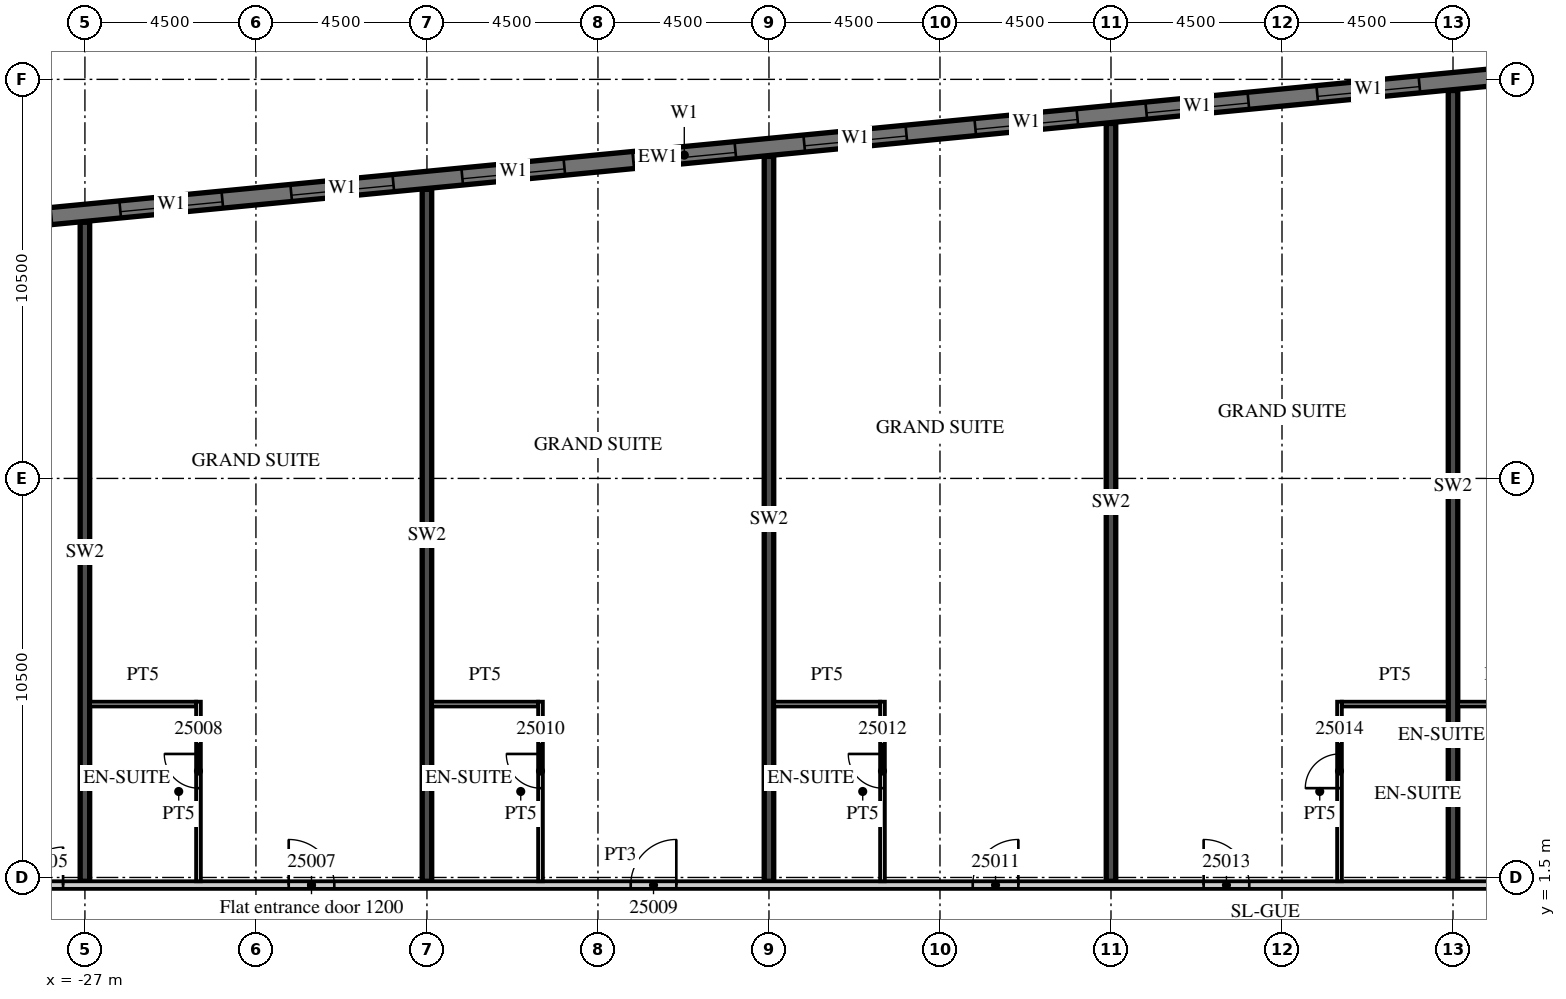
"""IFC4 building model, lengths in metres.
Left out: names, types, materials, properties, quantities, classifications, styles, units other than length and angle.
Written with IfcOpenShell. Run it as: python <this file> out.ifc"""

import sys

from ifc_helpers import new_model, si_unit, direction, frame, frame_2d, origin, place, context, subcontext, project, spatial, rectangle, extrude, element, fill, save


model = new_model("IFC4")
c1 = context("Model", 3, precision=1e-05, world=origin(), true_north=direction((0.0, 1.0)))
c2 = subcontext(c1, "Body", "Model", "MODEL_VIEW")
j1 = project(units=[si_unit("LENGTHUNIT", "METRE"), si_unit("PLANEANGLEUNIT", "RADIAN")], contexts=[c1])
p1 = place(None, origin())
s1 = spatial("IfcSite", under=j1, at=p1, CompositionType="ELEMENT")
p2 = place(p1, origin())
s2 = spatial("IfcBuilding", under=s1, at=p2, CompositionType="ELEMENT")
p3 = place(p2, frame((0.0, 0.0, 117.4)))
s3 = spatial("IfcBuildingStorey", under=s2, at=p3, CompositionType="ELEMENT", Elevation=117.4)
p4 = place(p3, frame((-27.0, 1.4, 0.0), z_axis=(0.0, 0.0, 1.0), x_axis=(0.0, 1.0, 0.0)))
e1 = element("IfcWall", 1, at=p4, inside=s3, PredefinedType="SHEAR", context=c2, shape_type="SweptSolid", body=[
    extrude(rectangle(XDim=17.34, YDim=0.25, at=frame_2d((8.67, 0.0))), origin(), (0.0, 0.0, 1.0), 3.3),
])
p5 = place(p3, frame((-18.0, 1.4, 0.0), z_axis=(0.0, 0.0, 1.0), x_axis=(0.0, 1.0, 0.0)))
e2 = element("IfcWall", 2, at=p5, inside=s3, PredefinedType="SHEAR", context=c2, shape_type="SweptSolid", body=[
    extrude(rectangle(XDim=18.207, YDim=0.25, at=frame_2d((9.104, 0.0))), origin(), (0.0, 0.0, 1.0), 3.3),
])
p6 = place(p3, frame((-9.0, 1.4, 0.0), z_axis=(0.0, 0.0, 1.0), x_axis=(0.0, 1.0, 0.0)))
e3 = element("IfcWall", 3, at=p6, inside=s3, PredefinedType="SHEAR", context=c2, shape_type="SweptSolid", body=[
    extrude(rectangle(XDim=19.073, YDim=0.25, at=frame_2d((9.537, 0.0))), origin(), (0.0, 0.0, 1.0), 3.3),
])
p7 = place(p3, frame((0.0, 1.4, 0.0), z_axis=(0.0, 0.0, 1.0), x_axis=(0.0, 1.0, 0.0)))
e4 = element("IfcWall", 4, at=p7, inside=s3, PredefinedType="SHEAR", context=c2, shape_type="SweptSolid", body=[
    extrude(rectangle(XDim=19.94, YDim=0.25, at=frame_2d((9.97, 0.0))), origin(), (0.0, 0.0, 1.0), 3.3),
])
p8 = place(p3, frame((9.0, 1.4, 0.0), z_axis=(0.0, 0.0, 1.0), x_axis=(0.0, 1.0, 0.0)))
e5 = element("IfcWall", 5, at=p8, inside=s3, PredefinedType="SHEAR", context=c2, shape_type="SweptSolid", body=[
    extrude(rectangle(XDim=20.807, YDim=0.25, at=frame_2d((10.403, 0.0))), origin(), (0.0, 0.0, 1.0), 3.3),
])
p9 = place(p3, frame((13.521, 22.89, 0.0), z_axis=(0.0, 0.0, 1.0), x_axis=(-0.995396445054, -0.095843190545, 0.0)))
e6 = element("IfcWall", 6, at=p9, inside=s3, PredefinedType="SOLIDWALL", context=c2, shape_type="SweptSolid", body=[
    extrude(rectangle(XDim=51.114, YDim=0.45, at=frame_2d((25.557, 0.0))), origin(), (0.0, 0.0, 1.0), 3.02),
])
p10 = place(p9, frame((0.91, 0.0, 0.45)))
e7 = element("IfcOpeningElement", 7, at=p10, cuts=e6, PredefinedType="OPENING", context=c2, shape_type="SweptSolid", body=[
    extrude(rectangle(XDim=2.7, YDim=2.25, at=frame_2d((1.35, 1.125))), frame((0.0, 0.235, 0.0), z_axis=(0.0, -1.0, 0.0), x_axis=(1.0, 0.0, 0.0)), (0.0, 0.0, 1.0), 0.47),
])
p11 = place(p9, frame((5.431, 0.0, 0.45)))
e8 = element("IfcOpeningElement", 8, at=p11, cuts=e6, PredefinedType="OPENING", context=c2, shape_type="SweptSolid", body=[
    extrude(rectangle(XDim=2.7, YDim=2.25, at=frame_2d((1.35, 1.125))), frame((0.0, 0.235, 0.0), z_axis=(0.0, -1.0, 0.0), x_axis=(1.0, 0.0, 0.0)), (0.0, 0.0, 1.0), 0.47),
])
p12 = place(p9, frame((9.952, 0.0, 0.45)))
e9 = element("IfcOpeningElement", 9, at=p12, cuts=e6, PredefinedType="OPENING", context=c2, shape_type="SweptSolid", body=[
    extrude(rectangle(XDim=2.7, YDim=2.25, at=frame_2d((1.35, 1.125))), frame((0.0, 0.235, 0.0), z_axis=(0.0, -1.0, 0.0), x_axis=(1.0, 0.0, 0.0)), (0.0, 0.0, 1.0), 0.47),
])
p13 = place(p9, frame((14.473, 0.0, 0.45)))
e10 = element("IfcOpeningElement", 10, at=p13, cuts=e6, PredefinedType="OPENING", context=c2, shape_type="SweptSolid", body=[
    extrude(rectangle(XDim=2.7, YDim=2.25, at=frame_2d((1.35, 1.125))), frame((0.0, 0.235, 0.0), z_axis=(0.0, -1.0, 0.0), x_axis=(1.0, 0.0, 0.0)), (0.0, 0.0, 1.0), 0.47),
])
p14 = place(p9, frame((18.994, 0.0, 0.45)))
e11 = element("IfcOpeningElement", 11, at=p14, cuts=e6, PredefinedType="OPENING", context=c2, shape_type="SweptSolid", body=[
    extrude(rectangle(XDim=2.7, YDim=2.25, at=frame_2d((1.35, 1.125))), frame((0.0, 0.235, 0.0), z_axis=(0.0, -1.0, 0.0), x_axis=(1.0, 0.0, 0.0)), (0.0, 0.0, 1.0), 0.47),
])
p15 = place(p9, frame((23.514, 0.0, 0.45)))
e12 = element("IfcOpeningElement", 12, at=p15, cuts=e6, PredefinedType="OPENING", context=c2, shape_type="SweptSolid", body=[
    extrude(rectangle(XDim=2.7, YDim=2.25, at=frame_2d((1.35, 1.125))), frame((0.0, 0.235, 0.0), z_axis=(0.0, -1.0, 0.0), x_axis=(1.0, 0.0, 0.0)), (0.0, 0.0, 1.0), 0.47),
])
p16 = place(p9, frame((28.035, 0.0, 0.45)))
e13 = element("IfcOpeningElement", 13, at=p16, cuts=e6, PredefinedType="OPENING", context=c2, shape_type="SweptSolid", body=[
    extrude(rectangle(XDim=2.7, YDim=2.25, at=frame_2d((1.35, 1.125))), frame((0.0, 0.235, 0.0), z_axis=(0.0, -1.0, 0.0), x_axis=(1.0, 0.0, 0.0)), (0.0, 0.0, 1.0), 0.47),
])
p17 = place(p9, frame((32.556, 0.0, 0.45)))
e14 = element("IfcOpeningElement", 14, at=p17, cuts=e6, PredefinedType="OPENING", context=c2, shape_type="SweptSolid", body=[
    extrude(rectangle(XDim=2.7, YDim=2.25, at=frame_2d((1.35, 1.125))), frame((0.0, 0.235, 0.0), z_axis=(0.0, -1.0, 0.0), x_axis=(1.0, 0.0, 0.0)), (0.0, 0.0, 1.0), 0.47),
])
p18 = place(p9, frame((37.077, 0.0, 0.45)))
e15 = element("IfcOpeningElement", 15, at=p18, cuts=e6, PredefinedType="OPENING", context=c2, shape_type="SweptSolid", body=[
    extrude(rectangle(XDim=2.7, YDim=2.25, at=frame_2d((1.35, 1.125))), frame((0.0, 0.235, 0.0), z_axis=(0.0, -1.0, 0.0), x_axis=(1.0, 0.0, 0.0)), (0.0, 0.0, 1.0), 0.47),
])
p19 = place(p9, frame((41.598, 0.0, 0.45)))
e16 = element("IfcOpeningElement", 16, at=p19, cuts=e6, PredefinedType="OPENING", context=c2, shape_type="SweptSolid", body=[
    extrude(rectangle(XDim=2.7, YDim=2.25, at=frame_2d((1.35, 1.125))), frame((0.0, 0.235, 0.0), z_axis=(0.0, -1.0, 0.0), x_axis=(1.0, 0.0, 0.0)), (0.0, 0.0, 1.0), 0.47),
])
p20 = place(p9, frame((46.118, 0.0, 0.45)))
e17 = element("IfcOpeningElement", 17, at=p20, cuts=e6, PredefinedType="OPENING", context=c2, shape_type="SweptSolid", body=[
    extrude(rectangle(XDim=2.7, YDim=2.25, at=frame_2d((1.35, 1.125))), frame((0.0, 0.235, 0.0), z_axis=(0.0, -1.0, 0.0), x_axis=(1.0, 0.0, 0.0)), (0.0, 0.0, 1.0), 0.47),
])
p21 = place(p3, frame((-39.316, 1.3, 0.0), z_axis=(0.0, 0.0, 1.0), x_axis=(1.0, 0.0, 0.0)))
e18 = element("IfcWall", 18, at=p21, inside=s3, PredefinedType="PARTITIONING", context=c2, shape_type="SweptSolid", body=[
    extrude(rectangle(XDim=52.816, YDim=0.2, at=frame_2d((26.408, 0.0))), origin(), (0.0, 0.0, 1.0), 3.02),
])
p22 = place(p21, frame((0.15, 0.0, 0.0)))
e19 = element("IfcOpeningElement", 19, at=p22, cuts=e18, PredefinedType="OPENING", context=c2, shape_type="SweptSolid", body=[
    extrude(rectangle(XDim=0.9, YDim=2.1, at=frame_2d((0.45, 1.05))), frame((0.0, 0.11, 0.0), z_axis=(0.0, -1.0, 0.0), x_axis=(1.0, 0.0, 0.0)), (0.0, 0.0, 1.0), 0.22),
])
p23 = place(p21, frame((6.266, 0.0, 0.0)))
e20 = element("IfcOpeningElement", 20, at=p23, cuts=e18, PredefinedType="OPENING", context=c2, shape_type="SweptSolid", body=[
    extrude(rectangle(XDim=1.0, YDim=2.1, at=frame_2d((0.5, 1.05))), frame((0.0, 0.11, 0.0), z_axis=(0.0, -1.0, 0.0), x_axis=(1.0, 0.0, 0.0)), (0.0, 0.0, 1.0), 0.22),
])
p24 = place(p21, frame((10.741, 0.0, 0.0)))
e21 = element("IfcOpeningElement", 21, at=p24, cuts=e18, PredefinedType="OPENING", context=c2, shape_type="SweptSolid", body=[
    extrude(rectangle(XDim=1.0, YDim=2.1, at=frame_2d((0.5, 1.05))), frame((0.0, 0.11, 0.0), z_axis=(0.0, -1.0, 0.0), x_axis=(1.0, 0.0, 0.0)), (0.0, 0.0, 1.0), 0.22),
])
p25 = place(p21, frame((17.678, 0.0, 0.0)))
e22 = element("IfcOpeningElement", 22, at=p25, cuts=e18, PredefinedType="OPENING", context=c2, shape_type="SweptSolid", body=[
    extrude(rectangle(XDim=1.2, YDim=2.1, at=frame_2d((0.6, 1.05))), frame((0.0, 0.11, 0.0), z_axis=(0.0, -1.0, 0.0), x_axis=(1.0, 0.0, 0.0)), (0.0, 0.0, 1.0), 0.22),
])
p26 = place(p21, frame((26.678, 0.0, 0.0)))
e23 = element("IfcOpeningElement", 23, at=p26, cuts=e18, PredefinedType="OPENING", context=c2, shape_type="SweptSolid", body=[
    extrude(rectangle(XDim=1.2, YDim=2.1, at=frame_2d((0.6, 1.05))), frame((0.0, 0.11, 0.0), z_axis=(0.0, -1.0, 0.0), x_axis=(1.0, 0.0, 0.0)), (0.0, 0.0, 1.0), 0.22),
])
p27 = place(p21, frame((35.678, 0.0, 0.0)))
e24 = element("IfcOpeningElement", 24, at=p27, cuts=e18, PredefinedType="OPENING", context=c2, shape_type="SweptSolid", body=[
    extrude(rectangle(XDim=1.2, YDim=2.1, at=frame_2d((0.6, 1.05))), frame((0.0, 0.11, 0.0), z_axis=(0.0, -1.0, 0.0), x_axis=(1.0, 0.0, 0.0)), (0.0, 0.0, 1.0), 0.22),
])
p28 = place(p21, frame((41.754, 0.0, 0.0)))
e25 = element("IfcOpeningElement", 25, at=p28, cuts=e18, PredefinedType="OPENING", context=c2, shape_type="SweptSolid", body=[
    extrude(rectangle(XDim=1.2, YDim=2.1, at=frame_2d((0.6, 1.05))), frame((0.0, 0.11, 0.0), z_axis=(0.0, -1.0, 0.0), x_axis=(1.0, 0.0, 0.0)), (0.0, 0.0, 1.0), 0.22),
])
p29 = place(p21, frame((51.241, 0.0, 0.0)))
e26 = element("IfcOpeningElement", 26, at=p29, cuts=e18, PredefinedType="OPENING", context=c2, shape_type="SweptSolid", body=[
    extrude(rectangle(XDim=1.0, YDim=2.1, at=frame_2d((0.5, 1.05))), frame((0.0, 0.11, 0.0), z_axis=(0.0, -1.0, 0.0), x_axis=(1.0, 0.0, 0.0)), (0.0, 0.0, 1.0), 0.22),
])
p30 = place(p3, frame((-24.012, 1.4, 0.0), z_axis=(0.0, 0.0, 1.0), x_axis=(0.0, 1.0, 0.0)))
e27 = element("IfcWall", 27, at=p30, inside=s3, PredefinedType="PARTITIONING", context=c2, shape_type="SweptSolid", body=[
    extrude(rectangle(XDim=4.725, YDim=0.125, at=frame_2d((2.363, 0.0))), origin(), (0.0, 0.0, 1.0), 3.02),
])
p31 = place(p30, frame((2.45, 0.0, 0.0)))
e28 = element("IfcOpeningElement", 28, at=p31, cuts=e27, PredefinedType="OPENING", context=c2, shape_type="SweptSolid", body=[
    extrude(rectangle(XDim=0.9, YDim=2.1, at=frame_2d((0.45, 1.05))), frame((0.0, 0.073, 0.0), z_axis=(0.0, -1.0, 0.0), x_axis=(1.0, 0.0, 0.0)), (0.0, 0.0, 1.0), 0.145),
])
p32 = place(p3, frame((-26.875, 6.062, 0.0), z_axis=(0.0, 0.0, 1.0), x_axis=(1.0, 0.0, 0.0)))
e29 = element("IfcWall", 29, at=p32, inside=s3, PredefinedType="PARTITIONING", context=c2, shape_type="SweptSolid", body=[
    extrude(rectangle(XDim=2.8, YDim=0.125, at=frame_2d((1.4, 0.0))), origin(), (0.0, 0.0, 1.0), 3.02),
])
p33 = place(p3, frame((-15.012, 1.4, 0.0), z_axis=(0.0, 0.0, 1.0), x_axis=(0.0, 1.0, 0.0)))
e30 = element("IfcWall", 30, at=p33, inside=s3, PredefinedType="PARTITIONING", context=c2, shape_type="SweptSolid", body=[
    extrude(rectangle(XDim=4.725, YDim=0.125, at=frame_2d((2.363, 0.0))), origin(), (0.0, 0.0, 1.0), 3.02),
])
p34 = place(p33, frame((2.45, 0.0, 0.0)))
e31 = element("IfcOpeningElement", 31, at=p34, cuts=e30, PredefinedType="OPENING", context=c2, shape_type="SweptSolid", body=[
    extrude(rectangle(XDim=0.9, YDim=2.1, at=frame_2d((0.45, 1.05))), frame((0.0, 0.073, 0.0), z_axis=(0.0, -1.0, 0.0), x_axis=(1.0, 0.0, 0.0)), (0.0, 0.0, 1.0), 0.145),
])
p35 = place(p3, frame((-17.875, 6.062, 0.0), z_axis=(0.0, 0.0, 1.0), x_axis=(1.0, 0.0, 0.0)))
e32 = element("IfcWall", 32, at=p35, inside=s3, PredefinedType="PARTITIONING", context=c2, shape_type="SweptSolid", body=[
    extrude(rectangle(XDim=2.8, YDim=0.125, at=frame_2d((1.4, 0.0))), origin(), (0.0, 0.0, 1.0), 3.02),
])
p36 = place(p3, frame((-6.013, 1.4, 0.0), z_axis=(0.0, 0.0, 1.0), x_axis=(0.0, 1.0, 0.0)))
e33 = element("IfcWall", 33, at=p36, inside=s3, PredefinedType="PARTITIONING", context=c2, shape_type="SweptSolid", body=[
    extrude(rectangle(XDim=4.725, YDim=0.125, at=frame_2d((2.363, 0.0))), origin(), (0.0, 0.0, 1.0), 3.02),
])
p37 = place(p36, frame((2.45, 0.0, 0.0)))
e34 = element("IfcOpeningElement", 34, at=p37, cuts=e33, PredefinedType="OPENING", context=c2, shape_type="SweptSolid", body=[
    extrude(rectangle(XDim=0.9, YDim=2.1, at=frame_2d((0.45, 1.05))), frame((0.0, 0.073, 0.0), z_axis=(0.0, -1.0, 0.0), x_axis=(1.0, 0.0, 0.0)), (0.0, 0.0, 1.0), 0.145),
])
p38 = place(p3, frame((-8.875, 6.062, 0.0), z_axis=(0.0, 0.0, 1.0), x_axis=(1.0, 0.0, 0.0)))
e35 = element("IfcWall", 35, at=p38, inside=s3, PredefinedType="PARTITIONING", context=c2, shape_type="SweptSolid", body=[
    extrude(rectangle(XDim=2.8, YDim=0.125, at=frame_2d((1.4, 0.0))), origin(), (0.0, 0.0, 1.0), 3.02),
])
p39 = place(p3, frame((6.013, 1.4, 0.0), z_axis=(0.0, 0.0, 1.0), x_axis=(0.0, 1.0, 0.0)))
e36 = element("IfcWall", 36, at=p39, inside=s3, PredefinedType="PARTITIONING", context=c2, shape_type="SweptSolid", body=[
    extrude(rectangle(XDim=4.725, YDim=0.125, at=frame_2d((2.363, 0.0))), origin(), (0.0, 0.0, 1.0), 3.02),
])
p40 = place(p39, frame((2.45, 0.0, 0.0)))
e37 = element("IfcOpeningElement", 37, at=p40, cuts=e36, PredefinedType="OPENING", context=c2, shape_type="SweptSolid", body=[
    extrude(rectangle(XDim=0.9, YDim=2.1, at=frame_2d((0.45, 1.05))), frame((0.0, 0.073, 0.0), z_axis=(0.0, -1.0, 0.0), x_axis=(1.0, 0.0, 0.0)), (0.0, 0.0, 1.0), 0.145),
])
p41 = place(p3, frame((6.075, 6.062, 0.0), z_axis=(0.0, 0.0, 1.0), x_axis=(1.0, 0.0, 0.0)))
e38 = element("IfcWall", 38, at=p41, inside=s3, PredefinedType="PARTITIONING", context=c2, shape_type="SweptSolid", body=[
    extrude(rectangle(XDim=2.8, YDim=0.125, at=frame_2d((1.4, 0.0))), origin(), (0.0, 0.0, 1.0), 3.02),
])
p42 = place(p3, frame((9.125, 6.062, 0.0), z_axis=(0.0, 0.0, 1.0), x_axis=(1.0, 0.0, 0.0)))
e39 = element("IfcWall", 39, at=p42, inside=s3, PredefinedType="PARTITIONING", context=c2, shape_type="SweptSolid", body=[
    extrude(rectangle(XDim=2.25, YDim=0.125, at=frame_2d((1.125, 0.0))), origin(), (0.0, 0.0, 1.0), 3.02),
])
p43 = place(p11, origin())
e40 = element("IfcWindow", 40, at=p43, inside=s3, PartitioningType="SINGLE_PANEL", PredefinedType="WINDOW", context=c2, shape_type="SweptSolid", body=[
    extrude(rectangle(XDim=2.7, YDim=2.25, at=frame_2d((1.35, 1.125))), frame((0.0, 0.09, 0.0), z_axis=(0.0, -1.0, 0.0), x_axis=(1.0, 0.0, 0.0)), (0.0, 0.0, 1.0), 0.06),
])
fill(e8, e40)
p44 = place(p12, origin())
e41 = element("IfcWindow", 41, at=p44, inside=s3, PartitioningType="SINGLE_PANEL", PredefinedType="WINDOW", context=c2, shape_type="SweptSolid", body=[
    extrude(rectangle(XDim=2.7, YDim=2.25, at=frame_2d((1.35, 1.125))), frame((0.0, 0.09, 0.0), z_axis=(0.0, -1.0, 0.0), x_axis=(1.0, 0.0, 0.0)), (0.0, 0.0, 1.0), 0.06),
])
fill(e9, e41)
p45 = place(p13, origin())
e42 = element("IfcWindow", 42, at=p45, inside=s3, PartitioningType="SINGLE_PANEL", PredefinedType="WINDOW", context=c2, shape_type="SweptSolid", body=[
    extrude(rectangle(XDim=2.7, YDim=2.25, at=frame_2d((1.35, 1.125))), frame((0.0, 0.09, 0.0), z_axis=(0.0, -1.0, 0.0), x_axis=(1.0, 0.0, 0.0)), (0.0, 0.0, 1.0), 0.06),
])
fill(e10, e42)
p46 = place(p14, origin())
e43 = element("IfcWindow", 43, at=p46, inside=s3, PartitioningType="SINGLE_PANEL", PredefinedType="WINDOW", context=c2, shape_type="SweptSolid", body=[
    extrude(rectangle(XDim=2.7, YDim=2.25, at=frame_2d((1.35, 1.125))), frame((0.0, 0.09, 0.0), z_axis=(0.0, -1.0, 0.0), x_axis=(1.0, 0.0, 0.0)), (0.0, 0.0, 1.0), 0.06),
])
fill(e11, e43)
p47 = place(p15, origin())
e44 = element("IfcWindow", 44, at=p47, inside=s3, PartitioningType="SINGLE_PANEL", PredefinedType="WINDOW", context=c2, shape_type="SweptSolid", body=[
    extrude(rectangle(XDim=2.7, YDim=2.25, at=frame_2d((1.35, 1.125))), frame((0.0, 0.09, 0.0), z_axis=(0.0, -1.0, 0.0), x_axis=(1.0, 0.0, 0.0)), (0.0, 0.0, 1.0), 0.06),
])
fill(e12, e44)
p48 = place(p16, origin())
e45 = element("IfcWindow", 45, at=p48, inside=s3, PartitioningType="SINGLE_PANEL", PredefinedType="WINDOW", context=c2, shape_type="SweptSolid", body=[
    extrude(rectangle(XDim=2.7, YDim=2.25, at=frame_2d((1.35, 1.125))), frame((0.0, 0.09, 0.0), z_axis=(0.0, -1.0, 0.0), x_axis=(1.0, 0.0, 0.0)), (0.0, 0.0, 1.0), 0.06),
])
fill(e13, e45)
p49 = place(p17, origin())
e46 = element("IfcWindow", 46, at=p49, inside=s3, PartitioningType="SINGLE_PANEL", PredefinedType="WINDOW", context=c2, shape_type="SweptSolid", body=[
    extrude(rectangle(XDim=2.7, YDim=2.25, at=frame_2d((1.35, 1.125))), frame((0.0, 0.09, 0.0), z_axis=(0.0, -1.0, 0.0), x_axis=(1.0, 0.0, 0.0)), (0.0, 0.0, 1.0), 0.06),
])
fill(e14, e46)
p50 = place(p18, origin())
e47 = element("IfcWindow", 47, at=p50, inside=s3, PartitioningType="SINGLE_PANEL", PredefinedType="WINDOW", context=c2, shape_type="SweptSolid", body=[
    extrude(rectangle(XDim=2.7, YDim=2.25, at=frame_2d((1.35, 1.125))), frame((0.0, 0.09, 0.0), z_axis=(0.0, -1.0, 0.0), x_axis=(1.0, 0.0, 0.0)), (0.0, 0.0, 1.0), 0.06),
])
fill(e15, e47)
p51 = place(p24, origin())
e48 = element("IfcDoor", 48, at=p51, inside=s3, OperationType="SINGLE_SWING_RIGHT", PredefinedType="DOOR", context=c2, shape_type="SweptSolid", body=[
    extrude(rectangle(XDim=1.0, YDim=2.1, at=frame_2d((0.5, 1.05))), frame((0.0, 0.025, 0.0), z_axis=(0.0, -1.0, 0.0), x_axis=(1.0, 0.0, 0.0)), (0.0, 0.0, 1.0), 0.05),
])
fill(e21, e48)
p52 = place(p25, origin())
e49 = element("IfcDoor", 49, at=p52, inside=s3, OperationType="SINGLE_SWING_LEFT", PredefinedType="DOOR", context=c2, shape_type="SweptSolid", body=[
    extrude(rectangle(XDim=1.2, YDim=2.1, at=frame_2d((0.6, 1.05))), frame((0.0, 0.025, 0.0), z_axis=(0.0, -1.0, 0.0), x_axis=(1.0, 0.0, 0.0)), (0.0, 0.0, 1.0), 0.05),
])
fill(e22, e49)
p53 = place(p31, origin())
e50 = element("IfcDoor", 50, at=p53, inside=s3, OperationType="SINGLE_SWING_RIGHT", PredefinedType="DOOR", context=c2, shape_type="SweptSolid", body=[
    extrude(rectangle(XDim=0.9, YDim=2.1, at=frame_2d((0.45, 1.05))), frame((0.0, 0.025, 0.0), z_axis=(0.0, -1.0, 0.0), x_axis=(1.0, 0.0, 0.0)), (0.0, 0.0, 1.0), 0.05),
])
fill(e28, e50)
p54 = place(p26, origin())
e51 = element("IfcDoor", 51, at=p54, inside=s3, OperationType="SINGLE_SWING_RIGHT", PredefinedType="DOOR", context=c2, shape_type="SweptSolid", body=[
    extrude(rectangle(XDim=1.2, YDim=2.1, at=frame_2d((0.6, 1.05))), frame((0.0, 0.025, 0.0), z_axis=(0.0, -1.0, 0.0), x_axis=(1.0, 0.0, 0.0)), (0.0, 0.0, 1.0), 0.05),
])
fill(e23, e51)
p55 = place(p34, origin())
e52 = element("IfcDoor", 52, at=p55, inside=s3, OperationType="SINGLE_SWING_RIGHT", PredefinedType="DOOR", context=c2, shape_type="SweptSolid", body=[
    extrude(rectangle(XDim=0.9, YDim=2.1, at=frame_2d((0.45, 1.05))), frame((0.0, 0.025, 0.0), z_axis=(0.0, -1.0, 0.0), x_axis=(1.0, 0.0, 0.0)), (0.0, 0.0, 1.0), 0.05),
])
fill(e31, e52)
p56 = place(p27, origin())
e53 = element("IfcDoor", 53, at=p56, inside=s3, OperationType="SINGLE_SWING_RIGHT", PredefinedType="DOOR", context=c2, shape_type="SweptSolid", body=[
    extrude(rectangle(XDim=1.2, YDim=2.1, at=frame_2d((0.6, 1.05))), frame((0.0, 0.025, 0.0), z_axis=(0.0, -1.0, 0.0), x_axis=(1.0, 0.0, 0.0)), (0.0, 0.0, 1.0), 0.05),
])
fill(e24, e53)
p57 = place(p37, origin())
e54 = element("IfcDoor", 54, at=p57, inside=s3, OperationType="SINGLE_SWING_RIGHT", PredefinedType="DOOR", context=c2, shape_type="SweptSolid", body=[
    extrude(rectangle(XDim=0.9, YDim=2.1, at=frame_2d((0.45, 1.05))), frame((0.0, 0.025, 0.0), z_axis=(0.0, -1.0, 0.0), x_axis=(1.0, 0.0, 0.0)), (0.0, 0.0, 1.0), 0.05),
])
fill(e34, e54)
p58 = place(p28, origin())
e55 = element("IfcDoor", 55, at=p58, inside=s3, OperationType="SINGLE_SWING_LEFT", PredefinedType="DOOR", context=c2, shape_type="SweptSolid", body=[
    extrude(rectangle(XDim=1.2, YDim=2.1, at=frame_2d((0.6, 1.05))), frame((0.0, 0.025, 0.0), z_axis=(0.0, -1.0, 0.0), x_axis=(1.0, 0.0, 0.0)), (0.0, 0.0, 1.0), 0.05),
])
fill(e25, e55)
p59 = place(p40, origin())
e56 = element("IfcDoor", 56, at=p59, inside=s3, OperationType="SINGLE_SWING_LEFT", PredefinedType="DOOR", context=c2, shape_type="SweptSolid", body=[
    extrude(rectangle(XDim=0.9, YDim=2.1, at=frame_2d((0.45, 1.05))), frame((0.0, 0.025, 0.0), z_axis=(0.0, -1.0, 0.0), x_axis=(1.0, 0.0, 0.0)), (0.0, 0.0, 1.0), 0.05),
])
fill(e37, e56)
save(model, sys.argv[1])
